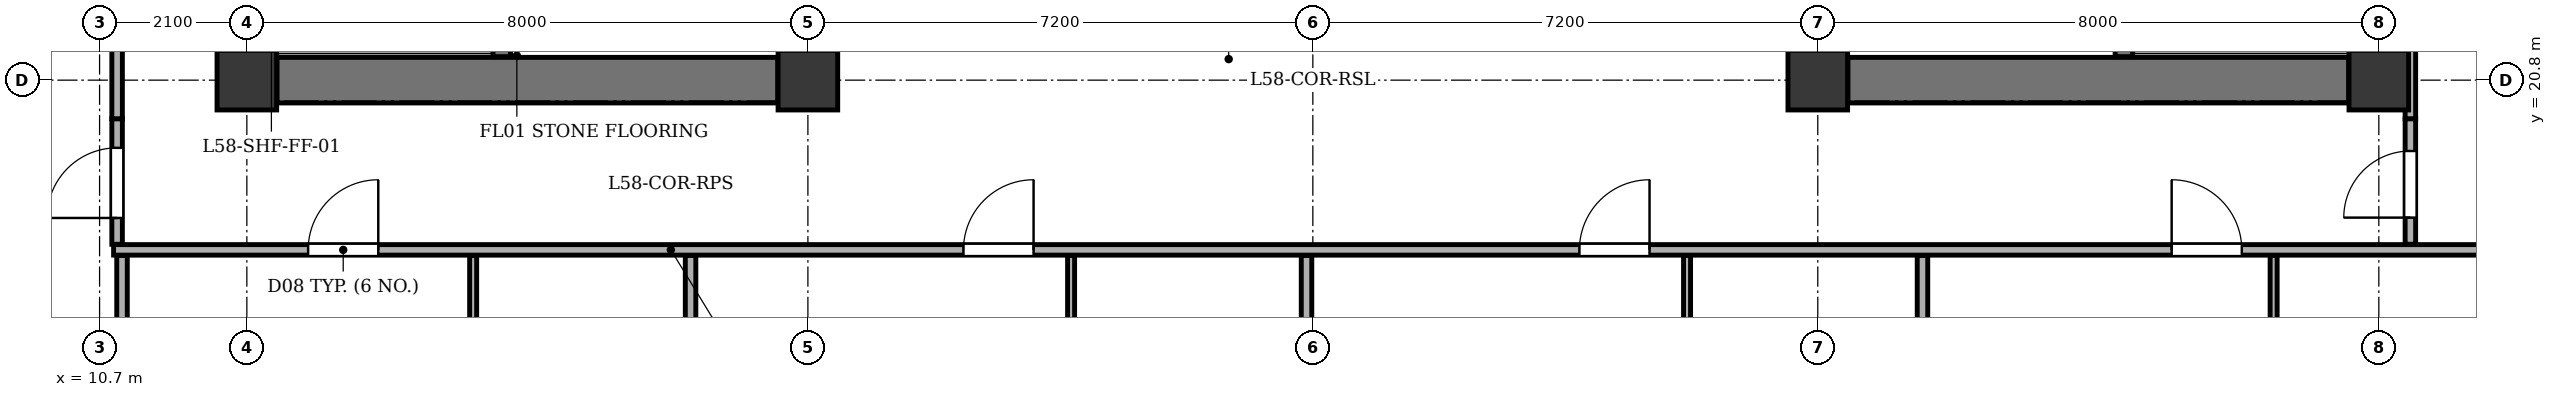
"""IFC4 building model, lengths in metres.
Left out: names, types, materials, properties, quantities, classifications, styles, units other than length and angle.
Written with IfcOpenShell. Run it as: python <this file> out.ifc"""

import sys

from ifc_helpers import new_model, si_unit, direction, frame, frame_2d, origin, origin_2d, place, context, subcontext, project, spatial, rectangle, extrude, element, fill, save


model = new_model("IFC4")
c1 = context("Model", 3, precision=1e-05, world=origin(), true_north=direction((0.0, 1.0)))
c2 = subcontext(c1, "Body", "Model", "MODEL_VIEW")
j1 = project(units=[si_unit("LENGTHUNIT", "METRE"), si_unit("PLANEANGLEUNIT", "RADIAN")], contexts=[c1])
p1 = place(None, origin())
s1 = spatial("IfcSite", under=j1, at=p1, CompositionType="ELEMENT")
p2 = place(p1, origin())
s2 = spatial("IfcBuilding", under=s1, at=p2, CompositionType="ELEMENT")
p3 = place(p2, frame((0.0, 0.0, 224.5)))
s3 = spatial("IfcBuildingStorey", under=s2, at=p3, CompositionType="ELEMENT", Elevation=224.5)
for number, where, z_axis, x_axis in (
    (1, (12.8, 20.8, 0.0), (0.0, 0.0, 1.0), (1.0, 0.0, 0.0)),
    (2, (20.8, 20.8, 0.0), (0.0, 0.0, 1.0), (1.0, 0.0, 0.0)),
    (3, (35.2, 20.8, 0.0), (0.0, 0.0, 1.0), (1.0, 0.0, 0.0)),
    (4, (43.2, 20.8, 0.0), (0.0, 0.0, 1.0), (1.0, 0.0, 0.0)),
):
    element("IfcColumn", number, at=place(p3, frame(where, z_axis=z_axis, x_axis=x_axis)), inside=s3, PredefinedType="COLUMN", context=c2, shape_type="SweptSolid", body=[
        extrude(rectangle(XDim=0.85, YDim=0.85, at=origin_2d()), origin(), (0.0, 0.0, 1.0), 3.4),
    ])
p4 = place(p3, frame((13.23, 20.8, 0.0), z_axis=(0.0, 0.0, 1.0), x_axis=(1.0, 0.0, 0.0)))
e5 = element("IfcWall", 5, at=p4, inside=s3, PredefinedType="SHEAR", context=c2, shape_type="SweptSolid", body=[
    extrude(rectangle(XDim=7.14, YDim=0.65, at=frame_2d((3.57, 0.0))), origin(), (0.0, 0.0, 1.0), 2.95),
])
p5 = place(p3, frame((16.435, 21.135, 0.0), z_axis=(0.0, 0.0, 1.0), x_axis=(0.0, 1.0, 0.0)))
e6 = element("IfcWall", 6, at=p5, inside=s3, PredefinedType="SHEAR", context=c2, shape_type="SweptSolid", body=[
    extrude(rectangle(XDim=12.13, YDim=0.25, at=frame_2d((6.065, 0.0))), origin(), (0.0, 0.0, 1.0), 2.95),
])
p6 = place(p5, frame((0.515, 0.0, 0.0)))
e7 = element("IfcOpeningElement", 7, at=p6, cuts=e6, PredefinedType="OPENING", context=c2, shape_type="SweptSolid", body=[
    extrude(rectangle(XDim=1.2, YDim=2.15, at=frame_2d((0.6, 1.075))), frame((0.0, 0.135, 0.0), z_axis=(0.0, -1.0, 0.0), x_axis=(1.0, 0.0, 0.0)), (0.0, 0.0, 1.0), 0.27),
])
p7 = place(p5, frame((2.665, 0.0, 0.0)))
e8 = element("IfcOpeningElement", 8, at=p7, cuts=e6, PredefinedType="OPENING", context=c2, shape_type="SweptSolid", body=[
    extrude(rectangle(XDim=1.15, YDim=2.15, at=frame_2d((0.575, 1.075))), frame((0.0, 0.135, 0.0), z_axis=(0.0, -1.0, 0.0), x_axis=(1.0, 0.0, 0.0)), (0.0, 0.0, 1.0), 0.27),
])
p8 = place(p3, frame((35.63, 20.8, 0.0), z_axis=(0.0, 0.0, 1.0), x_axis=(1.0, 0.0, 0.0)))
e9 = element("IfcWall", 9, at=p8, inside=s3, PredefinedType="SHEAR", context=c2, shape_type="SweptSolid", body=[
    extrude(rectangle(XDim=7.14, YDim=0.65, at=frame_2d((3.57, 0.0))), origin(), (0.0, 0.0, 1.0), 2.95),
])
p9 = place(p3, frame((39.565, 21.135, 0.0), z_axis=(0.0, 0.0, 1.0), x_axis=(0.0, 1.0, 0.0)))
e10 = element("IfcWall", 10, at=p9, inside=s3, PredefinedType="SHEAR", context=c2, shape_type="SweptSolid", body=[
    extrude(rectangle(XDim=12.13, YDim=0.25, at=frame_2d((6.065, 0.0))), origin(), (0.0, 0.0, 1.0), 2.95),
])
p10 = place(p9, frame((0.515, 0.0, 0.0)))
e11 = element("IfcOpeningElement", 11, at=p10, cuts=e10, PredefinedType="OPENING", context=c2, shape_type="SweptSolid", body=[
    extrude(rectangle(XDim=1.2, YDim=2.15, at=frame_2d((0.6, 1.075))), frame((0.0, 0.135, 0.0), z_axis=(0.0, -1.0, 0.0), x_axis=(1.0, 0.0, 0.0)), (0.0, 0.0, 1.0), 0.27),
])
p11 = place(p9, frame((2.665, 0.0, 0.0)))
e12 = element("IfcOpeningElement", 12, at=p11, cuts=e10, PredefinedType="OPENING", context=c2, shape_type="SweptSolid", body=[
    extrude(rectangle(XDim=1.15, YDim=2.15, at=frame_2d((0.575, 1.075))), frame((0.0, 0.135, 0.0), z_axis=(0.0, -1.0, 0.0), x_axis=(1.0, 0.0, 0.0)), (0.0, 0.0, 1.0), 0.27),
])
p12 = place(p3, frame((10.9, 18.38, 0.0), z_axis=(0.0, 0.0, 1.0), x_axis=(1.0, 0.0, 0.0)))
e13 = element("IfcWall", 13, at=p12, inside=s3, PredefinedType="PARTITIONING", context=c2, shape_type="SweptSolid", body=[
    extrude(rectangle(XDim=34.02, YDim=0.15, at=frame_2d((17.01, 0.0))), origin(), (0.0, 0.0, 1.0), 2.95),
])
p13 = place(p12, frame((2.774, 0.0, 0.0)))
e14 = element("IfcOpeningElement", 14, at=p13, cuts=e13, PredefinedType="OPENING", context=c2, shape_type="SweptSolid", body=[
    extrude(rectangle(XDim=1.0, YDim=2.1, at=frame_2d((0.5, 1.05))), frame((0.0, 0.085, 0.0), z_axis=(0.0, -1.0, 0.0), x_axis=(1.0, 0.0, 0.0)), (0.0, 0.0, 1.0), 0.17),
])
p14 = place(p12, frame((12.118, 0.0, 0.0)))
e15 = element("IfcOpeningElement", 15, at=p14, cuts=e13, PredefinedType="OPENING", context=c2, shape_type="SweptSolid", body=[
    extrude(rectangle(XDim=1.0, YDim=2.1, at=frame_2d((0.5, 1.05))), frame((0.0, 0.085, 0.0), z_axis=(0.0, -1.0, 0.0), x_axis=(1.0, 0.0, 0.0)), (0.0, 0.0, 1.0), 0.17),
])
p15 = place(p12, frame((20.901, 0.0, 0.0)))
e16 = element("IfcOpeningElement", 16, at=p15, cuts=e13, PredefinedType="OPENING", context=c2, shape_type="SweptSolid", body=[
    extrude(rectangle(XDim=1.0, YDim=2.1, at=frame_2d((0.5, 1.05))), frame((0.0, 0.085, 0.0), z_axis=(0.0, -1.0, 0.0), x_axis=(1.0, 0.0, 0.0)), (0.0, 0.0, 1.0), 0.17),
])
p16 = place(p12, frame((29.346, 0.0, 0.0)))
e17 = element("IfcOpeningElement", 17, at=p16, cuts=e13, PredefinedType="OPENING", context=c2, shape_type="SweptSolid", body=[
    extrude(rectangle(XDim=1.0, YDim=2.1, at=frame_2d((0.5, 1.05))), frame((0.0, 0.085, 0.0), z_axis=(0.0, -1.0, 0.0), x_axis=(1.0, 0.0, 0.0)), (0.0, 0.0, 1.0), 0.17),
])
p17 = place(p3, frame((11.02, 3.045, 0.0), z_axis=(0.0, 0.0, 1.0), x_axis=(0.0, 1.0, 0.0)))
e18 = element("IfcWall", 18, at=p17, inside=s3, PredefinedType="PARTITIONING", context=c2, shape_type="SweptSolid", body=[
    extrude(rectangle(XDim=15.255, YDim=0.15, at=frame_2d((7.627, 0.0))), origin(), (0.0, 0.0, 1.0), 2.335),
])
p18 = place(p3, frame((16.027, 5.605, 0.0), z_axis=(0.0, 0.0, 1.0), x_axis=(0.0, 1.0, 0.0)))
e19 = element("IfcWall", 19, at=p18, inside=s3, PredefinedType="PARTITIONING", context=c2, shape_type="SweptSolid", body=[
    extrude(rectangle(XDim=12.695, YDim=0.1, at=frame_2d((6.348, 0.0))), origin(), (0.0, 0.0, 1.0), 2.95),
])
p19 = place(p18, frame((0.205, 0.0, 0.0)))
e20 = element("IfcOpeningElement", 20, at=p19, cuts=e19, PredefinedType="OPENING", context=c2, shape_type="SweptSolid", body=[
    extrude(rectangle(XDim=0.9, YDim=2.05, at=frame_2d((0.45, 1.025))), frame((0.0, 0.06, 0.0), z_axis=(0.0, -1.0, 0.0), x_axis=(1.0, 0.0, 0.0)), (0.0, 0.0, 1.0), 0.12),
])
p20 = place(p3, frame((19.127, 3.045, 0.0), z_axis=(0.0, 0.0, 1.0), x_axis=(0.0, 1.0, 0.0)))
e21 = element("IfcWall", 21, at=p20, inside=s3, PredefinedType="PARTITIONING", context=c2, shape_type="SweptSolid", body=[
    extrude(rectangle(XDim=15.255, YDim=0.15, at=frame_2d((7.627, 0.0))), origin(), (0.0, 0.0, 1.0), 2.95),
])
p21 = place(p3, frame((24.553, 5.605, 0.0), z_axis=(0.0, 0.0, 1.0), x_axis=(0.0, 1.0, 0.0)))
e22 = element("IfcWall", 22, at=p21, inside=s3, PredefinedType="PARTITIONING", context=c2, shape_type="SweptSolid", body=[
    extrude(rectangle(XDim=12.695, YDim=0.1, at=frame_2d((6.348, 0.0))), origin(), (0.0, 0.0, 1.0), 2.95),
])
p22 = place(p21, frame((0.605, 0.0, 0.0)))
e23 = element("IfcOpeningElement", 23, at=p22, cuts=e22, PredefinedType="OPENING", context=c2, shape_type="SweptSolid", body=[
    extrude(rectangle(XDim=0.9, YDim=2.05, at=frame_2d((0.45, 1.025))), frame((0.0, 0.06, 0.0), z_axis=(0.0, -1.0, 0.0), x_axis=(1.0, 0.0, 0.0)), (0.0, 0.0, 1.0), 0.12),
])
p23 = place(p3, frame((27.91, 3.045, 0.0), z_axis=(0.0, 0.0, 1.0), x_axis=(0.0, 1.0, 0.0)))
e24 = element("IfcWall", 24, at=p23, inside=s3, PredefinedType="PARTITIONING", context=c2, shape_type="SweptSolid", body=[
    extrude(rectangle(XDim=15.255, YDim=0.15, at=frame_2d((7.627, 0.0))), origin(), (0.0, 0.0, 1.0), 2.135),
])
p24 = place(p3, frame((33.336, 5.605, 0.0), z_axis=(0.0, 0.0, 1.0), x_axis=(0.0, 1.0, 0.0)))
e25 = element("IfcWall", 25, at=p24, inside=s3, PredefinedType="PARTITIONING", context=c2, shape_type="SweptSolid", body=[
    extrude(rectangle(XDim=12.695, YDim=0.1, at=frame_2d((6.348, 0.0))), origin(), (0.0, 0.0, 1.0), 2.95),
])
p25 = place(p24, frame((0.605, 0.0, 0.0)))
e26 = element("IfcOpeningElement", 26, at=p25, cuts=e25, PredefinedType="OPENING", context=c2, shape_type="SweptSolid", body=[
    extrude(rectangle(XDim=0.9, YDim=2.05, at=frame_2d((0.45, 1.025))), frame((0.0, 0.06, 0.0), z_axis=(0.0, -1.0, 0.0), x_axis=(1.0, 0.0, 0.0)), (0.0, 0.0, 1.0), 0.12),
])
p26 = place(p3, frame((36.693, 3.045, 0.0), z_axis=(0.0, 0.0, 1.0), x_axis=(0.0, 1.0, 0.0)))
e27 = element("IfcWall", 27, at=p26, inside=s3, PredefinedType="PARTITIONING", context=c2, shape_type="SweptSolid", body=[
    extrude(rectangle(XDim=15.255, YDim=0.15, at=frame_2d((7.627, 0.0))), origin(), (0.0, 0.0, 1.0), 2.385),
])
p27 = place(p3, frame((41.7, 5.605, 0.0), z_axis=(0.0, 0.0, 1.0), x_axis=(0.0, 1.0, 0.0)))
e28 = element("IfcWall", 28, at=p27, inside=s3, PredefinedType="PARTITIONING", context=c2, shape_type="SweptSolid", body=[
    extrude(rectangle(XDim=12.695, YDim=0.1, at=frame_2d((6.348, 0.0))), origin(), (0.0, 0.0, 1.0), 2.95),
])
p28 = place(p27, frame((0.205, 0.0, 0.0)))
e29 = element("IfcOpeningElement", 29, at=p28, cuts=e28, PredefinedType="OPENING", context=c2, shape_type="SweptSolid", body=[
    extrude(rectangle(XDim=0.9, YDim=2.05, at=frame_2d((0.45, 1.025))), frame((0.0, 0.06, 0.0), z_axis=(0.0, -1.0, 0.0), x_axis=(1.0, 0.0, 0.0)), (0.0, 0.0, 1.0), 0.12),
])
p29 = place(p3, frame((10.95, 18.46, 0.0), z_axis=(0.0, 0.0, 1.0), x_axis=(0.0, 1.0, 0.0)))
e30 = element("IfcWall", 30, at=p29, inside=s3, PredefinedType="PARTITIONING", context=c2, shape_type="SweptSolid", body=[
    extrude(rectangle(XDim=1.79, YDim=0.15, at=frame_2d((0.895, 0.0))), origin(), (0.0, 0.0, 1.0), 2.335),
])
p30 = place(p29, frame((0.375, 0.0, 0.0)))
e31 = element("IfcOpeningElement", 31, at=p30, cuts=e30, PredefinedType="OPENING", context=c2, shape_type="SweptSolid", body=[
    extrude(rectangle(XDim=1.0, YDim=2.1, at=frame_2d((0.5, 1.05))), frame((0.0, 0.085, 0.0), z_axis=(0.0, -1.0, 0.0), x_axis=(1.0, 0.0, 0.0)), (0.0, 0.0, 1.0), 0.17),
])
p31 = place(p3, frame((10.95, 20.25, 0.0), z_axis=(0.0, 0.0, 1.0), x_axis=(0.0, 1.0, 0.0)))
e32 = element("IfcWall", 32, at=p31, inside=s3, PredefinedType="PARTITIONING", context=c2, shape_type="SweptSolid", body=[
    extrude(rectangle(XDim=13.9, YDim=0.15, at=frame_2d((6.95, 0.0))), origin(), (0.0, 0.0, 1.0), 2.335),
])
p32 = place(p3, frame((43.65, 18.46, 0.0), z_axis=(0.0, 0.0, 1.0), x_axis=(0.0, 1.0, 0.0)))
e33 = element("IfcWall", 33, at=p32, inside=s3, PredefinedType="PARTITIONING", context=c2, shape_type="SweptSolid", body=[
    extrude(rectangle(XDim=1.79, YDim=0.15, at=frame_2d((0.895, 0.0))), origin(), (0.0, 0.0, 1.0), 2.95),
])
p33 = place(p32, frame((0.38, 0.0, 0.0)))
e34 = element("IfcOpeningElement", 34, at=p33, cuts=e33, PredefinedType="OPENING", context=c2, shape_type="SweptSolid", body=[
    extrude(rectangle(XDim=0.95, YDim=2.1, at=frame_2d((0.475, 1.05))), frame((0.0, 0.085, 0.0), z_axis=(0.0, -1.0, 0.0), x_axis=(1.0, 0.0, 0.0)), (0.0, 0.0, 1.0), 0.17),
])
p34 = place(p3, frame((43.65, 20.25, 0.0), z_axis=(0.0, 0.0, 1.0), x_axis=(0.0, 1.0, 0.0)))
e35 = element("IfcWall", 35, at=p34, inside=s3, PredefinedType="PARTITIONING", context=c2, shape_type="SweptSolid", body=[
    extrude(rectangle(XDim=13.27, YDim=0.15, at=frame_2d((6.635, 0.0))), origin(), (0.0, 0.0, 1.0), 2.95),
])
p35 = place(p13, origin())
e36 = element("IfcDoor", 36, at=p35, inside=s3, OperationType="SINGLE_SWING_RIGHT", PredefinedType="DOOR", context=c2, shape_type="SweptSolid", body=[
    extrude(rectangle(XDim=1.0, YDim=2.1, at=frame_2d((0.5, 1.05))), frame((0.0, 0.025, 0.0), z_axis=(0.0, -1.0, 0.0), x_axis=(1.0, 0.0, 0.0)), (0.0, 0.0, 1.0), 0.05),
])
fill(e14, e36)
p36 = place(p14, origin())
e37 = element("IfcDoor", 37, at=p36, inside=s3, OperationType="SINGLE_SWING_RIGHT", PredefinedType="DOOR", context=c2, shape_type="SweptSolid", body=[
    extrude(rectangle(XDim=1.0, YDim=2.1, at=frame_2d((0.5, 1.05))), frame((0.0, 0.025, 0.0), z_axis=(0.0, -1.0, 0.0), x_axis=(1.0, 0.0, 0.0)), (0.0, 0.0, 1.0), 0.05),
])
fill(e15, e37)
p37 = place(p15, origin())
e38 = element("IfcDoor", 38, at=p37, inside=s3, OperationType="SINGLE_SWING_RIGHT", PredefinedType="DOOR", context=c2, shape_type="SweptSolid", body=[
    extrude(rectangle(XDim=1.0, YDim=2.1, at=frame_2d((0.5, 1.05))), frame((0.0, 0.025, 0.0), z_axis=(0.0, -1.0, 0.0), x_axis=(1.0, 0.0, 0.0)), (0.0, 0.0, 1.0), 0.05),
])
fill(e16, e38)
p38 = place(p16, origin())
e39 = element("IfcDoor", 39, at=p38, inside=s3, OperationType="SINGLE_SWING_LEFT", PredefinedType="DOOR", context=c2, shape_type="SweptSolid", body=[
    extrude(rectangle(XDim=1.0, YDim=2.1, at=frame_2d((0.5, 1.05))), frame((0.0, 0.025, 0.0), z_axis=(0.0, -1.0, 0.0), x_axis=(1.0, 0.0, 0.0)), (0.0, 0.0, 1.0), 0.05),
])
fill(e17, e39)
p39 = place(p30, origin())
e40 = element("IfcDoor", 40, at=p39, inside=s3, OperationType="SINGLE_SWING_LEFT", PredefinedType="DOOR", context=c2, shape_type="SweptSolid", body=[
    extrude(rectangle(XDim=1.0, YDim=2.1, at=frame_2d((0.5, 1.05))), frame((0.0, 0.025, 0.0), z_axis=(0.0, -1.0, 0.0), x_axis=(1.0, 0.0, 0.0)), (0.0, 0.0, 1.0), 0.05),
])
fill(e31, e40)
p40 = place(p33, origin())
e41 = element("IfcDoor", 41, at=p40, inside=s3, OperationType="SINGLE_SWING_LEFT", PredefinedType="DOOR", context=c2, shape_type="SweptSolid", body=[
    extrude(rectangle(XDim=0.95, YDim=2.1, at=frame_2d((0.475, 1.05))), frame((0.0, 0.025, 0.0), z_axis=(0.0, -1.0, 0.0), x_axis=(1.0, 0.0, 0.0)), (0.0, 0.0, 1.0), 0.05),
])
fill(e34, e41)
save(model, sys.argv[1])
